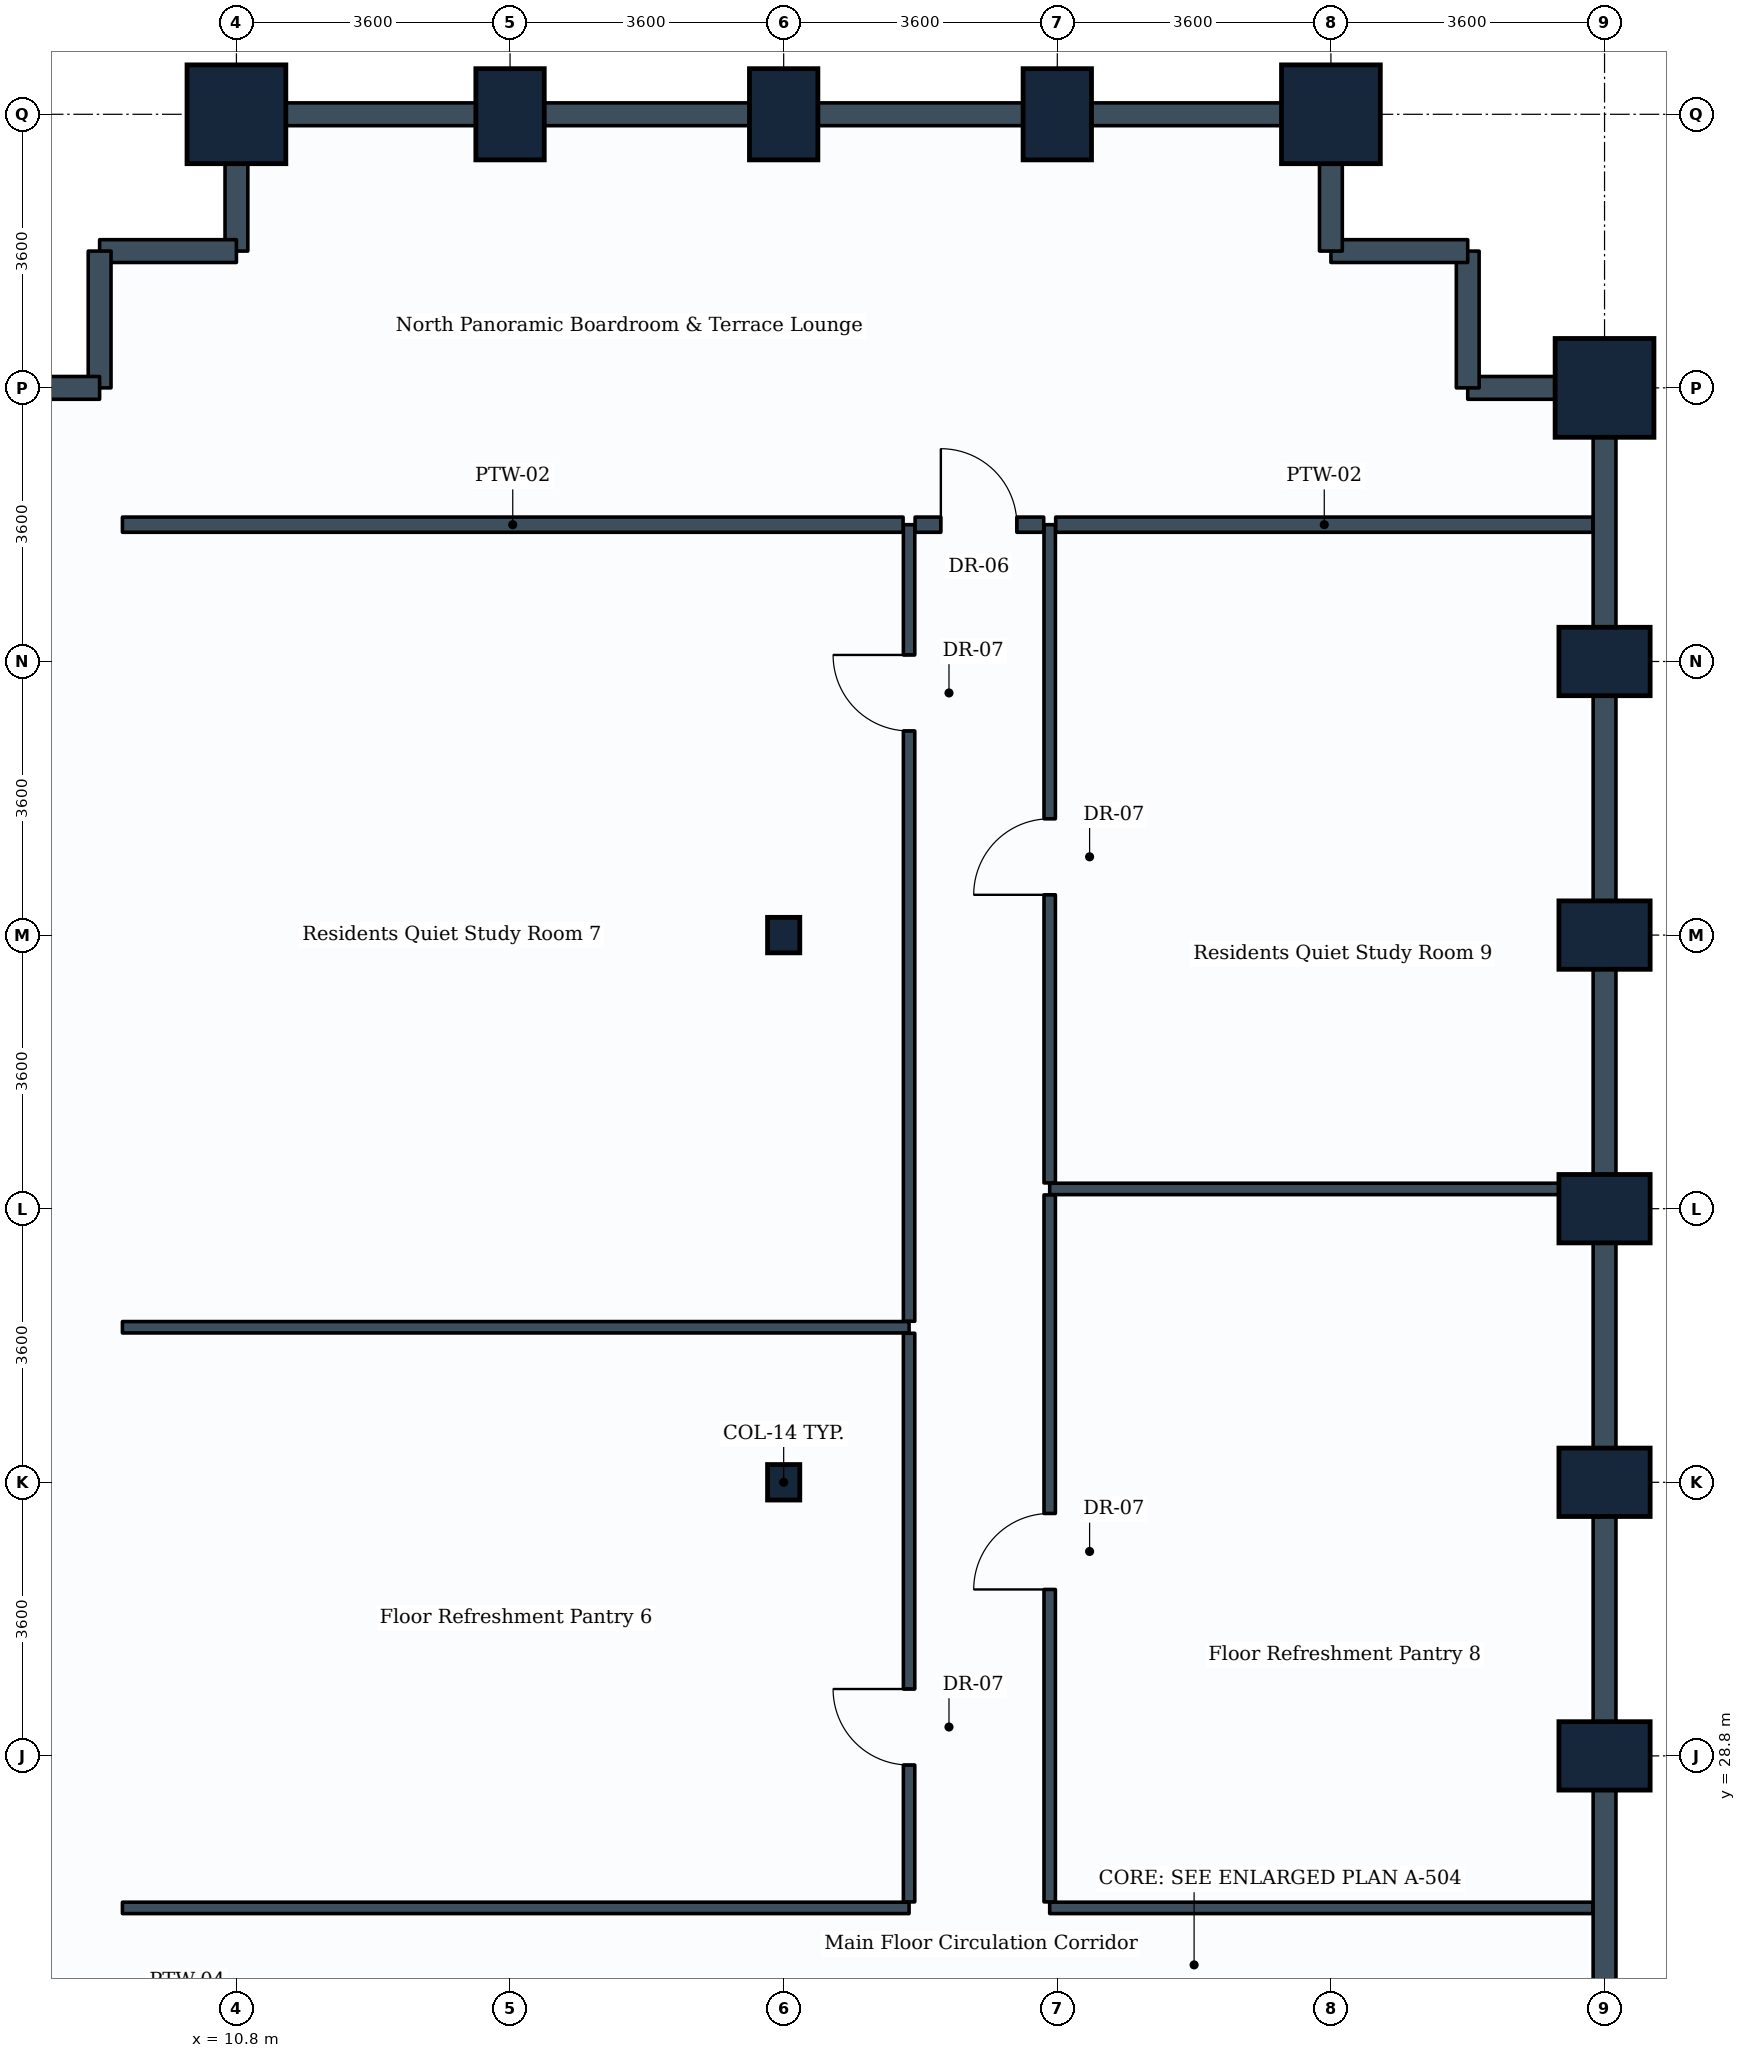
"""IFC4 building model, lengths in metres.
Left out: names, types, materials, properties, quantities, classifications, styles, units other than length and angle.
Written with IfcOpenShell. Run it as: python <this file> out.ifc"""

import sys

from ifc_helpers import new_model, si_unit, direction, frame, frame_2d, origin, origin_2d, place, context, subcontext, project, spatial, rectangle, i_section, extrude, element, fill, save


model = new_model("IFC4")
c1 = context("Model", 3, precision=1e-05, world=origin(), true_north=direction((0.0, 1.0)))
c2 = subcontext(c1, "Body", "Model", "MODEL_VIEW")
j1 = project(units=[si_unit("LENGTHUNIT", "METRE"), si_unit("PLANEANGLEUNIT", "RADIAN")], contexts=[c1])
p1 = place(None, origin())
s1 = spatial("IfcSite", under=j1, at=p1, CompositionType="ELEMENT")
p2 = place(p1, origin())
s2 = spatial("IfcBuilding", under=s1, at=p2, CompositionType="ELEMENT")
p3 = place(p2, frame((0.0, 0.0, 51.3)))
s3 = spatial("IfcBuildingStorey", under=s2, at=p3, CompositionType="ELEMENT", Elevation=51.3)
p4 = place(p3, frame((10.8, 50.4, 0.0), z_axis=(0.0, 0.0, 1.0), x_axis=(1.0, 0.0, 0.0)))
e1 = element("IfcColumn", 1, at=p4, inside=s3, PredefinedType="COLUMN", context=c2, shape_type="SweptSolid", body=[
    extrude(rectangle(XDim=1.3, YDim=1.3, at=origin_2d()), origin(), (0.0, 0.0, 1.0), 3.9),
])
p5 = place(p3, frame((14.4, 50.4, 0.0), z_axis=(0.0, 0.0, 1.0), x_axis=(1.0, 0.0, 0.0)))
e2 = element("IfcColumn", 2, at=p5, inside=s3, PredefinedType="COLUMN", context=c2, shape_type="SweptSolid", body=[
    extrude(rectangle(XDim=0.9, YDim=1.2, at=origin_2d()), origin(), (0.0, 0.0, 1.0), 3.9),
])
for number, where, z_axis, x_axis in (
    (3, (18.0, 32.4, 0.0), (0.0, 0.0, 1.0), (1.0, 0.0, 0.0)),
    (4, (18.0, 39.6, 0.0), (0.0, 0.0, 1.0), (1.0, 0.0, 0.0)),
):
    element("IfcColumn", number, at=place(p3, frame(where, z_axis=z_axis, x_axis=x_axis)), inside=s3, PredefinedType="COLUMN", context=c2, shape_type="SweptSolid", body=[
        extrude(i_section(OverallWidth=0.424, OverallDepth=0.467, WebThickness=0.033, FlangeThickness=0.053, FilletRadius=0.015, at=origin_2d()), origin(), (0.0, 0.0, 1.0), 3.9),
    ])
for number, where, z_axis, x_axis in (
    (5, (18.0, 50.4, 0.0), (0.0, 0.0, 1.0), (1.0, 0.0, 0.0)),
    (6, (21.6, 50.4, 0.0), (0.0, 0.0, 1.0), (1.0, 0.0, 0.0)),
):
    element("IfcColumn", number, at=place(p3, frame(where, z_axis=z_axis, x_axis=x_axis)), inside=s3, PredefinedType="COLUMN", context=c2, shape_type="SweptSolid", body=[
        extrude(rectangle(XDim=0.9, YDim=1.2, at=origin_2d()), origin(), (0.0, 0.0, 1.0), 3.9),
    ])
p6 = place(p3, frame((25.2, 50.4, 0.0), z_axis=(0.0, 0.0, 1.0), x_axis=(1.0, 0.0, 0.0)))
e7 = element("IfcColumn", 7, at=p6, inside=s3, PredefinedType="COLUMN", context=c2, shape_type="SweptSolid", body=[
    extrude(rectangle(XDim=1.3, YDim=1.3, at=origin_2d()), origin(), (0.0, 0.0, 1.0), 3.9),
])
for number, where, z_axis, x_axis in (
    (8, (28.8, 28.8, 0.0), (0.0, 0.0, 1.0), (0.0, 1.0, 0.0)),
    (9, (28.8, 32.4, 0.0), (0.0, 0.0, 1.0), (0.0, 1.0, 0.0)),
    (10, (28.8, 36.0, 0.0), (0.0, 0.0, 1.0), (0.0, 1.0, 0.0)),
    (11, (28.8, 39.6, 0.0), (0.0, 0.0, 1.0), (0.0, 1.0, 0.0)),
    (12, (28.8, 43.2, 0.0), (0.0, 0.0, 1.0), (0.0, 1.0, 0.0)),
):
    element("IfcColumn", number, at=place(p3, frame(where, z_axis=z_axis, x_axis=x_axis)), inside=s3, PredefinedType="COLUMN", context=c2, shape_type="SweptSolid", body=[
        extrude(rectangle(XDim=0.9, YDim=1.2, at=origin_2d()), origin(), (0.0, 0.0, 1.0), 3.9),
    ])
p7 = place(p3, frame((28.8, 46.8, 0.0), z_axis=(0.0, 0.0, 1.0), x_axis=(0.0, 1.0, 0.0)))
e13 = element("IfcColumn", 13, at=p7, inside=s3, PredefinedType="COLUMN", context=c2, shape_type="SweptSolid", body=[
    extrude(rectangle(XDim=1.3, YDim=1.3, at=origin_2d()), origin(), (0.0, 0.0, 1.0), 3.9),
])
p8 = place(p3, frame((28.8, 25.2, 0.0), z_axis=(0.0, 0.0, 1.0), x_axis=(0.0, 1.0, 0.0)))
e14 = element("IfcWall", 14, at=p8, inside=s3, PredefinedType="STANDARD", context=c2, shape_type="SweptSolid", body=[
    extrude(rectangle(XDim=3.6, YDim=0.3, at=frame_2d((1.8, 0.0))), origin(), (0.0, 0.0, 1.0), 3.14),
])
p9 = place(p3, frame((28.8, 28.8, 0.0), z_axis=(0.0, 0.0, 1.0), x_axis=(0.0, 1.0, 0.0)))
e15 = element("IfcWall", 15, at=p9, inside=s3, PredefinedType="STANDARD", context=c2, shape_type="SweptSolid", body=[
    extrude(rectangle(XDim=3.6, YDim=0.3, at=frame_2d((1.8, 0.0))), origin(), (0.0, 0.0, 1.0), 2.93),
])
for number, where, z_axis, x_axis in (
    (16, (28.8, 32.4, 0.0), (0.0, 0.0, 1.0), (0.0, 1.0, 0.0)),
    (17, (28.8, 36.0, 0.0), (0.0, 0.0, 1.0), (0.0, 1.0, 0.0)),
):
    element("IfcWall", number, at=place(p3, frame(where, z_axis=z_axis, x_axis=x_axis)), inside=s3, PredefinedType="STANDARD", context=c2, shape_type="SweptSolid", body=[
        extrude(rectangle(XDim=3.6, YDim=0.3, at=frame_2d((1.8, 0.0))), origin(), (0.0, 0.0, 1.0), 2.93),
    ])
p10 = place(p3, frame((28.8, 39.6, 0.0), z_axis=(0.0, 0.0, 1.0), x_axis=(0.0, 1.0, 0.0)))
e18 = element("IfcWall", 18, at=p10, inside=s3, PredefinedType="STANDARD", context=c2, shape_type="SweptSolid", body=[
    extrude(rectangle(XDim=3.6, YDim=0.3, at=frame_2d((1.8, 0.0))), origin(), (0.0, 0.0, 1.0), 2.93),
])
p11 = place(p3, frame((28.8, 43.2, 0.0), z_axis=(0.0, 0.0, 1.0), x_axis=(0.0, 1.0, 0.0)))
e19 = element("IfcWall", 19, at=p11, inside=s3, PredefinedType="STANDARD", context=c2, shape_type="SweptSolid", body=[
    extrude(rectangle(XDim=3.6, YDim=0.3, at=frame_2d((1.8, 0.0))), origin(), (0.0, 0.0, 1.0), 2.93),
])
p12 = place(p3, frame((27.0, 46.8, 0.0), z_axis=(0.0, 0.0, 1.0), x_axis=(1.0, 0.0, 0.0)))
e20 = element("IfcWall", 20, at=p12, inside=s3, PredefinedType="STANDARD", context=c2, shape_type="SweptSolid", body=[
    extrude(rectangle(XDim=1.8, YDim=0.3, at=frame_2d((0.9, 0.0))), origin(), (0.0, 0.0, 1.0), 2.93),
])
for number, where, z_axis, x_axis in (
    (21, (27.0, 46.8, 0.0), (0.0, 0.0, 1.0), (0.0, 1.0, 0.0)),
    (22, (25.2, 48.6, 0.0), (0.0, 0.0, 1.0), (1.0, 0.0, 0.0)),
):
    element("IfcWall", number, at=place(p3, frame(where, z_axis=z_axis, x_axis=x_axis)), inside=s3, PredefinedType="STANDARD", context=c2, shape_type="SweptSolid", body=[
        extrude(rectangle(XDim=1.8, YDim=0.3, at=frame_2d((0.9, 0.0))), origin(), (0.0, 0.0, 1.0), 3.635),
    ])
p13 = place(p3, frame((25.2, 48.6, 0.0), z_axis=(0.0, 0.0, 1.0), x_axis=(0.0, 1.0, 0.0)))
e23 = element("IfcWall", 23, at=p13, inside=s3, PredefinedType="STANDARD", context=c2, shape_type="SweptSolid", body=[
    extrude(rectangle(XDim=1.8, YDim=0.3, at=frame_2d((0.9, 0.0))), origin(), (0.0, 0.0, 1.0), 2.93),
])
p14 = place(p3, frame((21.6, 50.4, 0.0), z_axis=(0.0, 0.0, 1.0), x_axis=(1.0, 0.0, 0.0)))
e24 = element("IfcWall", 24, at=p14, inside=s3, PredefinedType="STANDARD", context=c2, shape_type="SweptSolid", body=[
    extrude(rectangle(XDim=3.6, YDim=0.3, at=frame_2d((1.8, 0.0))), origin(), (0.0, 0.0, 1.0), 2.93),
])
for number, where, z_axis, x_axis in (
    (25, (18.0, 50.4, 0.0), (0.0, 0.0, 1.0), (1.0, 0.0, 0.0)),
    (26, (14.4, 50.4, 0.0), (0.0, 0.0, 1.0), (1.0, 0.0, 0.0)),
):
    element("IfcWall", number, at=place(p3, frame(where, z_axis=z_axis, x_axis=x_axis)), inside=s3, PredefinedType="STANDARD", context=c2, shape_type="SweptSolid", body=[
        extrude(rectangle(XDim=3.6, YDim=0.3, at=frame_2d((1.8, 0.0))), origin(), (0.0, 0.0, 1.0), 2.93),
    ])
p15 = place(p3, frame((10.8, 50.4, 0.0), z_axis=(0.0, 0.0, 1.0), x_axis=(1.0, 0.0, 0.0)))
e27 = element("IfcWall", 27, at=p15, inside=s3, PredefinedType="STANDARD", context=c2, shape_type="SweptSolid", body=[
    extrude(rectangle(XDim=3.6, YDim=0.3, at=frame_2d((1.8, 0.0))), origin(), (0.0, 0.0, 1.0), 2.93),
])
p16 = place(p3, frame((10.8, 48.6, 0.0), z_axis=(0.0, 0.0, 1.0), x_axis=(0.0, 1.0, 0.0)))
e28 = element("IfcWall", 28, at=p16, inside=s3, PredefinedType="STANDARD", context=c2, shape_type="SweptSolid", body=[
    extrude(rectangle(XDim=1.8, YDim=0.3, at=frame_2d((0.9, 0.0))), origin(), (0.0, 0.0, 1.0), 2.93),
])
for number, where, z_axis, x_axis in (
    (29, (9.0, 48.6, 0.0), (0.0, 0.0, 1.0), (1.0, 0.0, 0.0)),
    (30, (9.0, 46.8, 0.0), (0.0, 0.0, 1.0), (0.0, 1.0, 0.0)),
):
    element("IfcWall", number, at=place(p3, frame(where, z_axis=z_axis, x_axis=x_axis)), inside=s3, PredefinedType="STANDARD", context=c2, shape_type="SweptSolid", body=[
        extrude(rectangle(XDim=1.8, YDim=0.3, at=frame_2d((0.9, 0.0))), origin(), (0.0, 0.0, 1.0), 3.635),
    ])
p17 = place(p3, frame((7.2, 46.8, 0.0), z_axis=(0.0, 0.0, 1.0), x_axis=(1.0, 0.0, 0.0)))
e31 = element("IfcWall", 31, at=p17, inside=s3, PredefinedType="STANDARD", context=c2, shape_type="SweptSolid", body=[
    extrude(rectangle(XDim=1.8, YDim=0.3, at=frame_2d((0.9, 0.0))), origin(), (0.0, 0.0, 1.0), 2.93),
])
p18 = place(p3, frame((9.3, 26.8, 0.0), z_axis=(0.0, 0.0, 1.0), x_axis=(1.0, 0.0, 0.0)))
e32 = element("IfcWall", 32, at=p18, inside=s3, PredefinedType="PARTITIONING", context=c2, shape_type="SweptSolid", body=[
    extrude(rectangle(XDim=10.35, YDim=0.15, at=frame_2d((5.175, 0.0))), origin(), (0.0, 0.0, 1.0), 3.08),
])
p19 = place(p3, frame((9.3, 34.44, 0.0), z_axis=(0.0, 0.0, 1.0), x_axis=(1.0, 0.0, 0.0)))
e33 = element("IfcWall", 33, at=p19, inside=s3, PredefinedType="PARTITIONING", context=c2, shape_type="SweptSolid", body=[
    extrude(rectangle(XDim=10.35, YDim=0.15, at=frame_2d((5.175, 0.0))), origin(), (0.0, 0.0, 1.0), 3.03),
])
p20 = place(p3, frame((19.65, 26.879, 0.0), z_axis=(0.0, 0.0, 1.0), x_axis=(0.0, 1.0, 0.0)))
e34 = element("IfcWall", 34, at=p20, inside=s3, PredefinedType="PARTITIONING", context=c2, shape_type="SweptSolid", body=[
    extrude(rectangle(XDim=7.482, YDim=0.15, at=frame_2d((3.741, 0.0))), origin(), (0.0, 0.0, 1.0), 3.08),
])
p21 = place(p20, frame((1.801, 0.0, 0.0)))
e35 = element("IfcOpeningElement", 35, at=p21, cuts=e34, PredefinedType="OPENING", context=c2, shape_type="SweptSolid", body=[
    extrude(rectangle(XDim=1.0, YDim=2.1, at=frame_2d((0.5, 1.05))), frame((0.0, 0.085, 0.0), z_axis=(0.0, -1.0, 0.0), x_axis=(1.0, 0.0, 0.0)), (0.0, 0.0, 1.0), 0.17),
])
p22 = place(p3, frame((19.65, 34.519, 0.0), z_axis=(0.0, 0.0, 1.0), x_axis=(0.0, 1.0, 0.0)))
e36 = element("IfcWall", 36, at=p22, inside=s3, PredefinedType="PARTITIONING", context=c2, shape_type="SweptSolid", body=[
    extrude(rectangle(XDim=10.481, YDim=0.15, at=frame_2d((5.24, 0.0))), origin(), (0.0, 0.0, 1.0), 3.08),
])
p23 = place(p22, frame((7.767, 0.0, 0.0)))
e37 = element("IfcOpeningElement", 37, at=p23, cuts=e36, PredefinedType="OPENING", context=c2, shape_type="SweptSolid", body=[
    extrude(rectangle(XDim=1.0, YDim=2.1, at=frame_2d((0.5, 1.05))), frame((0.0, 0.085, 0.0), z_axis=(0.0, -1.0, 0.0), x_axis=(1.0, 0.0, 0.0)), (0.0, 0.0, 1.0), 0.17),
])
p24 = place(p3, frame((21.5, 26.8, 0.0), z_axis=(0.0, 0.0, 1.0), x_axis=(1.0, 0.0, 0.0)))
e38 = element("IfcWall", 38, at=p24, inside=s3, PredefinedType="PARTITIONING", context=c2, shape_type="SweptSolid", body=[
    extrude(rectangle(XDim=7.146, YDim=0.15, at=frame_2d((3.573, 0.0))), origin(), (0.0, 0.0, 1.0), 3.635),
])
p25 = place(p3, frame((21.5, 36.26, 0.0), z_axis=(0.0, 0.0, 1.0), x_axis=(1.0, 0.0, 0.0)))
e39 = element("IfcWall", 39, at=p25, inside=s3, PredefinedType="PARTITIONING", context=c2, shape_type="SweptSolid", body=[
    extrude(rectangle(XDim=7.146, YDim=0.15, at=frame_2d((3.573, 0.0))), origin(), (0.0, 0.0, 1.0), 2.93),
])
p26 = place(p3, frame((21.5, 26.879, 0.0), z_axis=(0.0, 0.0, 1.0), x_axis=(0.0, 1.0, 0.0)))
e40 = element("IfcWall", 40, at=p26, inside=s3, PredefinedType="PARTITIONING", context=c2, shape_type="SweptSolid", body=[
    extrude(rectangle(XDim=9.302, YDim=0.15, at=frame_2d((4.651, 0.0))), origin(), (0.0, 0.0, 1.0), 3.08),
])
p27 = place(p26, frame((4.111, 0.0, 0.0)))
e41 = element("IfcOpeningElement", 41, at=p27, cuts=e40, PredefinedType="OPENING", context=c2, shape_type="SweptSolid", body=[
    extrude(rectangle(XDim=1.0, YDim=2.1, at=frame_2d((0.5, 1.05))), frame((0.0, 0.085, 0.0), z_axis=(0.0, -1.0, 0.0), x_axis=(1.0, 0.0, 0.0)), (0.0, 0.0, 1.0), 0.17),
])
p28 = place(p3, frame((21.5, 36.339, 0.0), z_axis=(0.0, 0.0, 1.0), x_axis=(0.0, 1.0, 0.0)))
e42 = element("IfcWall", 42, at=p28, inside=s3, PredefinedType="PARTITIONING", context=c2, shape_type="SweptSolid", body=[
    extrude(rectangle(XDim=8.661, YDim=0.15, at=frame_2d((4.331, 0.0))), origin(), (0.0, 0.0, 1.0), 3.03),
])
p29 = place(p28, frame((3.791, 0.0, 0.0)))
e43 = element("IfcOpeningElement", 43, at=p29, cuts=e42, PredefinedType="OPENING", context=c2, shape_type="SweptSolid", body=[
    extrude(rectangle(XDim=1.0, YDim=2.1, at=frame_2d((0.5, 1.05))), frame((0.0, 0.085, 0.0), z_axis=(0.0, -1.0, 0.0), x_axis=(1.0, 0.0, 0.0)), (0.0, 0.0, 1.0), 0.17),
])
p30 = place(p3, frame((9.3, 45.0, 0.0), z_axis=(0.0, 0.0, 1.0), x_axis=(1.0, 0.0, 0.0)))
e44 = element("IfcWall", 44, at=p30, inside=s3, PredefinedType="PARTITIONING", context=c2, shape_type="SweptSolid", body=[
    extrude(rectangle(XDim=10.271, YDim=0.2, at=frame_2d((5.135, 0.0))), origin(), (0.0, 0.0, 1.0), 3.08),
])
p31 = place(p3, frame((21.579, 45.0, 0.0), z_axis=(0.0, 0.0, 1.0), x_axis=(1.0, 0.0, 0.0)))
e45 = element("IfcWall", 45, at=p31, inside=s3, PredefinedType="PARTITIONING", context=c2, shape_type="SweptSolid", body=[
    extrude(rectangle(XDim=7.067, YDim=0.2, at=frame_2d((3.533, 0.0))), origin(), (0.0, 0.0, 1.0), 2.93),
])
p32 = place(p3, frame((19.729, 45.0, 0.0), z_axis=(0.0, 0.0, 1.0), x_axis=(1.0, 0.0, 0.0)))
e46 = element("IfcWall", 46, at=p32, inside=s3, PredefinedType="PARTITIONING", context=c2, shape_type="SweptSolid", body=[
    extrude(rectangle(XDim=1.692, YDim=0.2, at=frame_2d((0.846, 0.0))), origin(), (0.0, 0.0, 1.0), 3.635),
])
p33 = place(p32, frame((0.339, 0.0, 0.0)))
e47 = element("IfcOpeningElement", 47, at=p33, cuts=e46, PredefinedType="OPENING", context=c2, shape_type="SweptSolid", body=[
    extrude(rectangle(XDim=1.0, YDim=2.1, at=frame_2d((0.5, 1.05))), frame((0.0, 0.11, 0.0), z_axis=(0.0, -1.0, 0.0), x_axis=(1.0, 0.0, 0.0)), (0.0, 0.0, 1.0), 0.22),
])
p34 = place(p21, origin())
e48 = element("IfcDoor", 48, at=p34, inside=s3, OperationType="SINGLE_SWING_RIGHT", PredefinedType="DOOR", context=c2, shape_type="SweptSolid", body=[
    extrude(rectangle(XDim=1.0, YDim=2.1, at=frame_2d((0.5, 1.05))), frame((0.0, 0.025, 0.0), z_axis=(0.0, -1.0, 0.0), x_axis=(1.0, 0.0, 0.0)), (0.0, 0.0, 1.0), 0.05),
])
fill(e35, e48)
p35 = place(p23, origin())
e49 = element("IfcDoor", 49, at=p35, inside=s3, OperationType="SINGLE_SWING_RIGHT", PredefinedType="DOOR", context=c2, shape_type="SweptSolid", body=[
    extrude(rectangle(XDim=1.0, YDim=2.1, at=frame_2d((0.5, 1.05))), frame((0.0, 0.025, 0.0), z_axis=(0.0, -1.0, 0.0), x_axis=(1.0, 0.0, 0.0)), (0.0, 0.0, 1.0), 0.05),
])
fill(e37, e49)
p36 = place(p27, origin())
e50 = element("IfcDoor", 50, at=p36, inside=s3, OperationType="SINGLE_SWING_LEFT", PredefinedType="DOOR", context=c2, shape_type="SweptSolid", body=[
    extrude(rectangle(XDim=1.0, YDim=2.1, at=frame_2d((0.5, 1.05))), frame((0.0, 0.025, 0.0), z_axis=(0.0, -1.0, 0.0), x_axis=(1.0, 0.0, 0.0)), (0.0, 0.0, 1.0), 0.05),
])
fill(e41, e50)
p37 = place(p29, origin())
e51 = element("IfcDoor", 51, at=p37, inside=s3, OperationType="SINGLE_SWING_LEFT", PredefinedType="DOOR", context=c2, shape_type="SweptSolid", body=[
    extrude(rectangle(XDim=1.0, YDim=2.1, at=frame_2d((0.5, 1.05))), frame((0.0, 0.025, 0.0), z_axis=(0.0, -1.0, 0.0), x_axis=(1.0, 0.0, 0.0)), (0.0, 0.0, 1.0), 0.05),
])
fill(e43, e51)
p38 = place(p33, origin())
e52 = element("IfcDoor", 52, at=p38, inside=s3, OperationType="SINGLE_SWING_LEFT", PredefinedType="DOOR", context=c2, shape_type="SweptSolid", body=[
    extrude(rectangle(XDim=1.0, YDim=2.1, at=frame_2d((0.5, 1.05))), frame((0.0, 0.025, 0.0), z_axis=(0.0, -1.0, 0.0), x_axis=(1.0, 0.0, 0.0)), (0.0, 0.0, 1.0), 0.05),
])
fill(e47, e52)
save(model, sys.argv[1])
